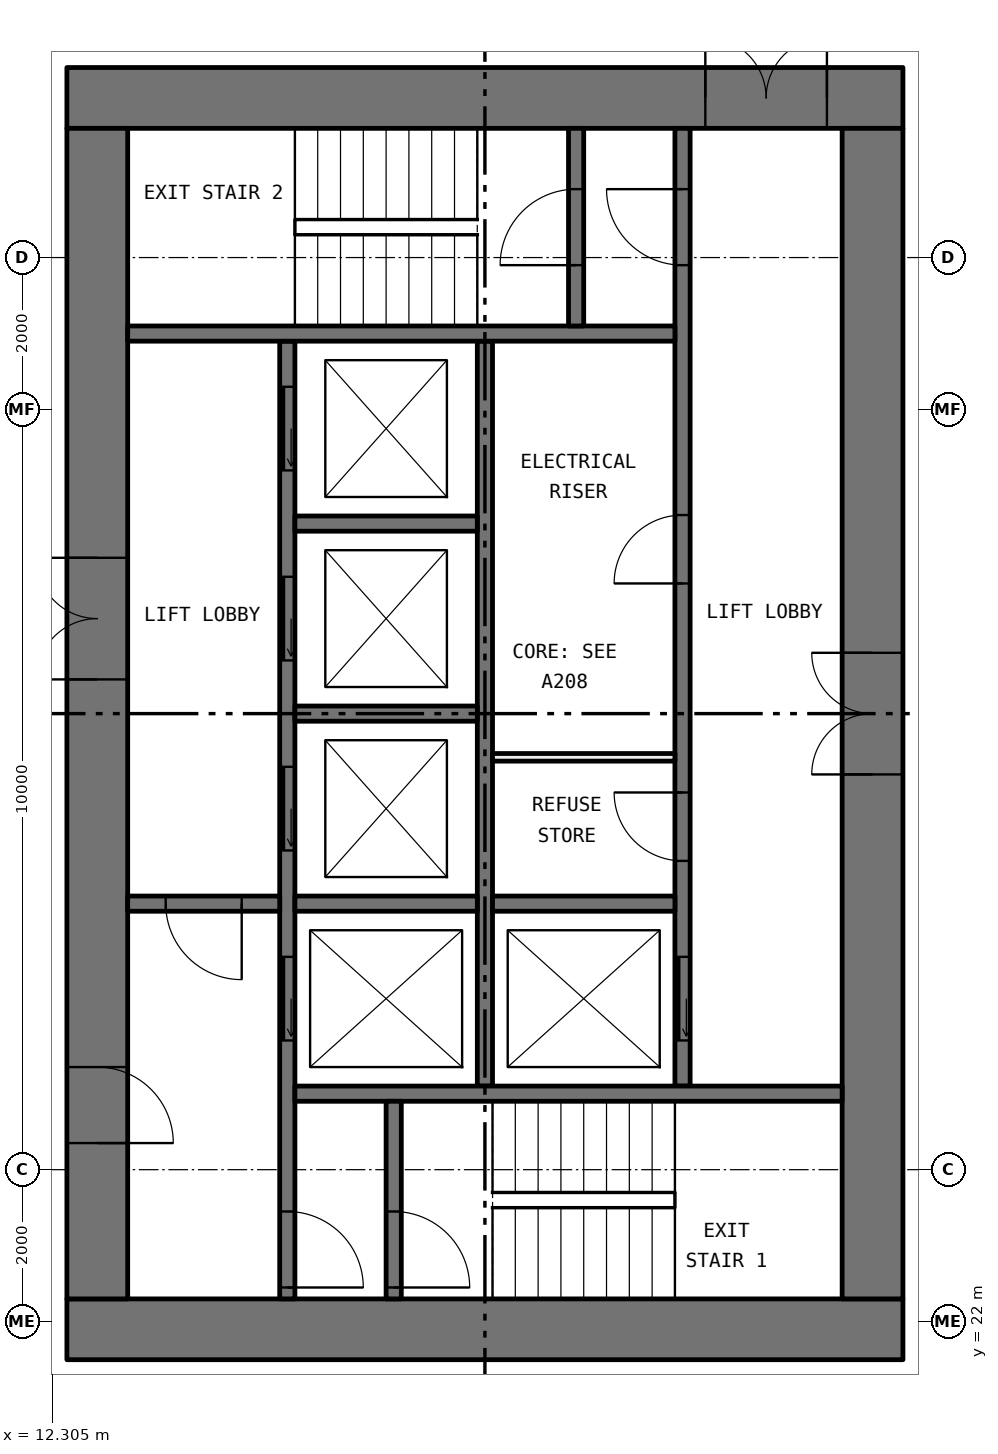
"""IFC4 building model, lengths in metres.
Left out: names, types, materials, properties, quantities, classifications, styles, units other than length and angle.
Written with IfcOpenShell. Run it as: python <this file> out.ifc"""

import sys

from ifc_helpers import new_model, si_unit, direction, frame, frame_2d, origin, place, context, subcontext, project, spatial, rectangle, extrude, element, fill, save


model = new_model("IFC4")
c1 = context("Model", 3, precision=1e-05, world=origin(), true_north=direction((0.0, 1.0)))
c2 = subcontext(c1, "Body", "Model", "MODEL_VIEW")
j1 = project(units=[si_unit("LENGTHUNIT", "METRE"), si_unit("PLANEANGLEUNIT", "RADIAN")], contexts=[c1])
p1 = place(None, origin())
s1 = spatial("IfcSite", under=j1, at=p1, CompositionType="ELEMENT")
p2 = place(p1, origin())
s2 = spatial("IfcBuilding", under=s1, at=p2, CompositionType="ELEMENT")
p3 = place(p2, frame((0.0, 0.0, 36.9)))
s3 = spatial("IfcBuildingStorey", under=s2, at=p3, CompositionType="ELEMENT", Elevation=36.9)
p4 = place(p3, frame((12.5, 21.9, 0.0), z_axis=(0.0, 0.0, 1.0), x_axis=(1.0, 0.0, 0.0)))
e1 = element("IfcWall", 1, at=p4, inside=s3, PredefinedType="SHEAR", context=c2, shape_type="SweptSolid", body=[
    extrude(rectangle(XDim=11.0, YDim=0.8, at=frame_2d((5.5, 0.0))), origin(), (0.0, 0.0, 1.0), 3.05),
])
p5 = place(p3, frame((12.5, 38.1, 0.0), z_axis=(0.0, 0.0, 1.0), x_axis=(1.0, 0.0, 0.0)))
e2 = element("IfcWall", 2, at=p5, inside=s3, PredefinedType="SHEAR", context=c2, shape_type="SweptSolid", body=[
    extrude(rectangle(XDim=11.0, YDim=0.8, at=frame_2d((5.5, 0.0))), origin(), (0.0, 0.0, 1.0), 3.05),
])
p6 = place(p5, frame((8.4, 0.0, 0.0)))
e3 = element("IfcOpeningElement", 3, at=p6, cuts=e2, PredefinedType="OPENING", context=c2, shape_type="SweptSolid", body=[
    extrude(rectangle(XDim=1.6, YDim=2.1, at=frame_2d((0.8, 1.05))), frame((0.0, 0.41, 0.0), z_axis=(0.0, -1.0, 0.0), x_axis=(1.0, 0.0, 0.0)), (0.0, 0.0, 1.0), 0.82),
])
p7 = place(p3, frame((12.9, 22.3, 0.0), z_axis=(0.0, 0.0, 1.0), x_axis=(0.0, 1.0, 0.0)))
e4 = element("IfcWall", 4, at=p7, inside=s3, PredefinedType="SHEAR", context=c2, shape_type="SweptSolid", body=[
    extrude(rectangle(XDim=15.4, YDim=0.8, at=frame_2d((7.7, 0.0))), origin(), (0.0, 0.0, 1.0), 3.05),
])
p8 = place(p7, frame((8.15, 0.0, 0.0)))
e5 = element("IfcOpeningElement", 5, at=p8, cuts=e4, PredefinedType="OPENING", context=c2, shape_type="SweptSolid", body=[
    extrude(rectangle(XDim=1.6, YDim=2.1, at=frame_2d((0.8, 1.05))), frame((0.0, 0.41, 0.0), z_axis=(0.0, -1.0, 0.0), x_axis=(1.0, 0.0, 0.0)), (0.0, 0.0, 1.0), 0.82),
])
p9 = place(p7, frame((2.05, 0.0, 0.0)))
e6 = element("IfcOpeningElement", 6, at=p9, cuts=e4, PredefinedType="OPENING", context=c2, shape_type="SweptSolid", body=[
    extrude(rectangle(XDim=1.0, YDim=2.1, at=frame_2d((0.5, 1.05))), frame((0.0, 0.41, 0.0), z_axis=(0.0, -1.0, 0.0), x_axis=(1.0, 0.0, 0.0)), (0.0, 0.0, 1.0), 0.82),
])
p10 = place(p3, frame((23.1, 22.3, 0.0), z_axis=(0.0, 0.0, 1.0), x_axis=(0.0, 1.0, 0.0)))
e7 = element("IfcWall", 7, at=p10, inside=s3, PredefinedType="SHEAR", context=c2, shape_type="SweptSolid", body=[
    extrude(rectangle(XDim=15.4, YDim=0.8, at=frame_2d((7.7, 0.0))), origin(), (0.0, 0.0, 1.0), 3.05),
])
p11 = place(p10, frame((6.9, 0.0, 0.0)))
e8 = element("IfcOpeningElement", 8, at=p11, cuts=e7, PredefinedType="OPENING", context=c2, shape_type="SweptSolid", body=[
    extrude(rectangle(XDim=1.6, YDim=2.1, at=frame_2d((0.8, 1.05))), frame((0.0, 0.41, 0.0), z_axis=(0.0, -1.0, 0.0), x_axis=(1.0, 0.0, 0.0)), (0.0, 0.0, 1.0), 0.82),
])
p12 = place(p3, frame((15.4, 22.3, 0.0), z_axis=(0.0, 0.0, 1.0), x_axis=(0.0, 1.0, 0.0)))
e9 = element("IfcWall", 9, at=p12, inside=s3, PredefinedType="SOLIDWALL", context=c2, shape_type="SweptSolid", body=[
    extrude(rectangle(XDim=12.6, YDim=0.2, at=frame_2d((6.3, 0.0))), origin(), (0.0, 0.0, 1.0), 3.05),
])
p13 = place(p12, frame((3.4, 0.0, 0.0)))
e10 = element("IfcOpeningElement", 10, at=p13, cuts=e9, PredefinedType="OPENING", context=c2, shape_type="SweptSolid", body=[
    extrude(rectangle(XDim=1.1, YDim=2.1, at=frame_2d((0.55, 1.05))), frame((0.0, 0.11, 0.0), z_axis=(0.0, -1.0, 0.0), x_axis=(1.0, 0.0, 0.0)), (0.0, 0.0, 1.0), 0.22),
])
p14 = place(p12, frame((5.9, 0.0, 0.0)))
e11 = element("IfcOpeningElement", 11, at=p14, cuts=e9, PredefinedType="OPENING", context=c2, shape_type="SweptSolid", body=[
    extrude(rectangle(XDim=1.1, YDim=2.1, at=frame_2d((0.55, 1.05))), frame((0.0, 0.11, 0.0), z_axis=(0.0, -1.0, 0.0), x_axis=(1.0, 0.0, 0.0)), (0.0, 0.0, 1.0), 0.22),
])
p15 = place(p12, frame((8.4, 0.0, 0.0)))
e12 = element("IfcOpeningElement", 12, at=p15, cuts=e9, PredefinedType="OPENING", context=c2, shape_type="SweptSolid", body=[
    extrude(rectangle(XDim=1.1, YDim=2.1, at=frame_2d((0.55, 1.05))), frame((0.0, 0.11, 0.0), z_axis=(0.0, -1.0, 0.0), x_axis=(1.0, 0.0, 0.0)), (0.0, 0.0, 1.0), 0.22),
])
p16 = place(p12, frame((10.9, 0.0, 0.0)))
e13 = element("IfcOpeningElement", 13, at=p16, cuts=e9, PredefinedType="OPENING", context=c2, shape_type="SweptSolid", body=[
    extrude(rectangle(XDim=1.1, YDim=2.1, at=frame_2d((0.55, 1.05))), frame((0.0, 0.11, 0.0), z_axis=(0.0, -1.0, 0.0), x_axis=(1.0, 0.0, 0.0)), (0.0, 0.0, 1.0), 0.22),
])
p17 = place(p12, frame((0.15, 0.0, 0.0)))
e14 = element("IfcOpeningElement", 14, at=p17, cuts=e9, PredefinedType="OPENING", context=c2, shape_type="SweptSolid", body=[
    extrude(rectangle(XDim=1.0, YDim=2.1, at=frame_2d((0.5, 1.05))), frame((0.0, 0.11, 0.0), z_axis=(0.0, -1.0, 0.0), x_axis=(1.0, 0.0, 0.0)), (0.0, 0.0, 1.0), 0.22),
])
p18 = place(p3, frame((20.6, 25.1, 0.0), z_axis=(0.0, 0.0, 1.0), x_axis=(0.0, 1.0, 0.0)))
e15 = element("IfcWall", 15, at=p18, inside=s3, PredefinedType="SOLIDWALL", context=c2, shape_type="SweptSolid", body=[
    extrude(rectangle(XDim=12.6, YDim=0.2, at=frame_2d((6.3, 0.0))), origin(), (0.0, 0.0, 1.0), 3.05),
])
p19 = place(p18, frame((0.6, 0.0, 0.0)))
e16 = element("IfcOpeningElement", 16, at=p19, cuts=e15, PredefinedType="OPENING", context=c2, shape_type="SweptSolid", body=[
    extrude(rectangle(XDim=1.1, YDim=2.1, at=frame_2d((0.55, 1.05))), frame((0.0, 0.11, 0.0), z_axis=(0.0, -1.0, 0.0), x_axis=(1.0, 0.0, 0.0)), (0.0, 0.0, 1.0), 0.22),
])
p20 = place(p18, frame((10.8, 0.0, 0.0)))
e17 = element("IfcOpeningElement", 17, at=p20, cuts=e15, PredefinedType="OPENING", context=c2, shape_type="SweptSolid", body=[
    extrude(rectangle(XDim=1.0, YDim=2.1, at=frame_2d((0.5, 1.05))), frame((0.0, 0.11, 0.0), z_axis=(0.0, -1.0, 0.0), x_axis=(1.0, 0.0, 0.0)), (0.0, 0.0, 1.0), 0.22),
])
p21 = place(p18, frame((2.962, 0.0, 0.0)))
e18 = element("IfcOpeningElement", 18, at=p21, cuts=e15, PredefinedType="OPENING", context=c2, shape_type="SweptSolid", body=[
    extrude(rectangle(XDim=0.9, YDim=2.1, at=frame_2d((0.45, 1.05))), frame((0.0, 0.11, 0.0), z_axis=(0.0, -1.0, 0.0), x_axis=(1.0, 0.0, 0.0)), (0.0, 0.0, 1.0), 0.22),
])
p22 = place(p18, frame((6.613, 0.0, 0.0)))
e19 = element("IfcOpeningElement", 19, at=p22, cuts=e15, PredefinedType="OPENING", context=c2, shape_type="SweptSolid", body=[
    extrude(rectangle(XDim=0.9, YDim=2.1, at=frame_2d((0.45, 1.05))), frame((0.0, 0.11, 0.0), z_axis=(0.0, -1.0, 0.0), x_axis=(1.0, 0.0, 0.0)), (0.0, 0.0, 1.0), 0.22),
])
p23 = place(p3, frame((18.0, 25.1, 0.0), z_axis=(0.0, 0.0, 1.0), x_axis=(0.0, 1.0, 0.0)))
e20 = element("IfcWall", 20, at=p23, inside=s3, PredefinedType="SOLIDWALL", context=c2, shape_type="SweptSolid", body=[
    extrude(rectangle(XDim=9.8, YDim=0.2, at=frame_2d((4.9, 0.0))), origin(), (0.0, 0.0, 1.0), 3.05),
])
for number, where, z_axis, x_axis in (
    (21, (15.5, 25.0, 0.0), (0.0, 0.0, 1.0), (1.0, 0.0, 0.0)),
    (22, (13.3, 35.0, 0.0), (0.0, 0.0, 1.0), (1.0, 0.0, 0.0)),
):
    element("IfcWall", number, at=place(p3, frame(where, z_axis=z_axis, x_axis=x_axis)), inside=s3, PredefinedType="SOLIDWALL", context=c2, shape_type="SweptSolid", body=[
        extrude(rectangle(XDim=7.2, YDim=0.2, at=frame_2d((3.6, 0.0))), origin(), (0.0, 0.0, 1.0), 3.05),
    ])
p24 = place(p3, frame((13.3, 27.5, 0.0), z_axis=(0.0, 0.0, 1.0), x_axis=(1.0, 0.0, 0.0)))
e23 = element("IfcWall", 23, at=p24, inside=s3, PredefinedType="SOLIDWALL", context=c2, shape_type="SweptSolid", body=[
    extrude(rectangle(XDim=2.0, YDim=0.2, at=frame_2d((1.0, 0.0))), origin(), (0.0, 0.0, 1.0), 3.05),
])
p25 = place(p24, frame((0.5, 0.0, 0.0)))
e24 = element("IfcOpeningElement", 24, at=p25, cuts=e23, PredefinedType="OPENING", context=c2, shape_type="SweptSolid", body=[
    extrude(rectangle(XDim=1.0, YDim=2.1, at=frame_2d((0.5, 1.05))), frame((0.0, 0.11, 0.0), z_axis=(0.0, -1.0, 0.0), x_axis=(1.0, 0.0, 0.0)), (0.0, 0.0, 1.0), 0.22),
])
p26 = place(p3, frame((16.8, 22.3, 0.0), z_axis=(0.0, 0.0, 1.0), x_axis=(0.0, 1.0, 0.0)))
e25 = element("IfcWall", 25, at=p26, inside=s3, PredefinedType="SOLIDWALL", context=c2, shape_type="SweptSolid", body=[
    extrude(rectangle(XDim=2.6, YDim=0.2, at=frame_2d((1.3, 0.0))), origin(), (0.0, 0.0, 1.0), 3.05),
])
p27 = place(p26, frame((0.15, 0.0, 0.0)))
e26 = element("IfcOpeningElement", 26, at=p27, cuts=e25, PredefinedType="OPENING", context=c2, shape_type="SweptSolid", body=[
    extrude(rectangle(XDim=1.0, YDim=2.1, at=frame_2d((0.5, 1.05))), frame((0.0, 0.11, 0.0), z_axis=(0.0, -1.0, 0.0), x_axis=(1.0, 0.0, 0.0)), (0.0, 0.0, 1.0), 0.22),
])
p28 = place(p3, frame((19.2, 35.1, 0.0), z_axis=(0.0, 0.0, 1.0), x_axis=(0.0, 1.0, 0.0)))
e27 = element("IfcWall", 27, at=p28, inside=s3, PredefinedType="SOLIDWALL", context=c2, shape_type="SweptSolid", body=[
    extrude(rectangle(XDim=2.6, YDim=0.2, at=frame_2d((1.3, 0.0))), origin(), (0.0, 0.0, 1.0), 3.05),
])
p29 = place(p28, frame((0.8, 0.0, 0.0)))
e28 = element("IfcOpeningElement", 28, at=p29, cuts=e27, PredefinedType="OPENING", context=c2, shape_type="SweptSolid", body=[
    extrude(rectangle(XDim=1.0, YDim=2.1, at=frame_2d((0.5, 1.05))), frame((0.0, 0.11, 0.0), z_axis=(0.0, -1.0, 0.0), x_axis=(1.0, 0.0, 0.0)), (0.0, 0.0, 1.0), 0.22),
])
for number, where, z_axis, x_axis in (
    (29, (15.5, 27.5, 0.0), (0.0, 0.0, 1.0), (1.0, 0.0, 0.0)),
    (30, (15.5, 30.0, 0.0), (0.0, 0.0, 1.0), (1.0, 0.0, 0.0)),
    (31, (15.5, 32.5, 0.0), (0.0, 0.0, 1.0), (1.0, 0.0, 0.0)),
    (32, (18.1, 27.5, 0.0), (0.0, 0.0, 1.0), (1.0, 0.0, 0.0)),
):
    element("IfcWall", number, at=place(p3, frame(where, z_axis=z_axis, x_axis=x_axis)), inside=s3, PredefinedType="SOLIDWALL", context=c2, shape_type="SweptSolid", body=[
        extrude(rectangle(XDim=2.4, YDim=0.2, at=frame_2d((1.2, 0.0))), origin(), (0.0, 0.0, 1.0), 3.05),
    ])
p30 = place(p3, frame((18.1, 29.425, 0.0), z_axis=(0.0, 0.0, 1.0), x_axis=(1.0, 0.0, 0.0)))
e33 = element("IfcWall", 33, at=p30, inside=s3, PredefinedType="PARTITIONING", context=c2, shape_type="SweptSolid", body=[
    extrude(rectangle(XDim=2.4, YDim=0.1, at=frame_2d((1.2, 0.0))), origin(), (0.0, 0.0, 1.0), 3.05),
])
p31 = place(p19, origin())
e34 = element("IfcDoor", 34, at=p31, inside=s3, OperationType="SLIDING_TO_LEFT", PredefinedType="DOOR", context=c2, shape_type="SweptSolid", body=[
    extrude(rectangle(XDim=1.1, YDim=2.1, at=frame_2d((0.55, 1.05))), frame((0.0, 0.025, 0.0), z_axis=(0.0, -1.0, 0.0), x_axis=(1.0, 0.0, 0.0)), (0.0, 0.0, 1.0), 0.05),
])
fill(e16, e34)
p32 = place(p13, origin())
e35 = element("IfcDoor", 35, at=p32, inside=s3, OperationType="SLIDING_TO_LEFT", PredefinedType="DOOR", context=c2, shape_type="SweptSolid", body=[
    extrude(rectangle(XDim=1.1, YDim=2.1, at=frame_2d((0.55, 1.05))), frame((0.0, 0.025, 0.0), z_axis=(0.0, -1.0, 0.0), x_axis=(1.0, 0.0, 0.0)), (0.0, 0.0, 1.0), 0.05),
])
fill(e10, e35)
p33 = place(p14, origin())
e36 = element("IfcDoor", 36, at=p33, inside=s3, OperationType="SLIDING_TO_LEFT", PredefinedType="DOOR", context=c2, shape_type="SweptSolid", body=[
    extrude(rectangle(XDim=1.1, YDim=2.1, at=frame_2d((0.55, 1.05))), frame((0.0, 0.025, 0.0), z_axis=(0.0, -1.0, 0.0), x_axis=(1.0, 0.0, 0.0)), (0.0, 0.0, 1.0), 0.05),
])
fill(e11, e36)
p34 = place(p15, origin())
e37 = element("IfcDoor", 37, at=p34, inside=s3, OperationType="SLIDING_TO_LEFT", PredefinedType="DOOR", context=c2, shape_type="SweptSolid", body=[
    extrude(rectangle(XDim=1.1, YDim=2.1, at=frame_2d((0.55, 1.05))), frame((0.0, 0.025, 0.0), z_axis=(0.0, -1.0, 0.0), x_axis=(1.0, 0.0, 0.0)), (0.0, 0.0, 1.0), 0.05),
])
fill(e12, e37)
p35 = place(p16, origin())
e38 = element("IfcDoor", 38, at=p35, inside=s3, OperationType="SLIDING_TO_LEFT", PredefinedType="DOOR", context=c2, shape_type="SweptSolid", body=[
    extrude(rectangle(XDim=1.1, YDim=2.1, at=frame_2d((0.55, 1.05))), frame((0.0, 0.025, 0.0), z_axis=(0.0, -1.0, 0.0), x_axis=(1.0, 0.0, 0.0)), (0.0, 0.0, 1.0), 0.05),
])
fill(e13, e38)
p36 = place(p27, frame((1.0, 0.0, 0.0), x_axis=(-1.0, 0.0, 0.0)))
e39 = element("IfcDoor", 39, at=p36, inside=s3, OperationType="SINGLE_SWING_LEFT", PredefinedType="DOOR", context=c2, shape_type="SweptSolid", body=[
    extrude(rectangle(XDim=1.0, YDim=2.1, at=frame_2d((0.5, 1.05))), frame((0.0, 0.025, 0.0), z_axis=(0.0, -1.0, 0.0), x_axis=(1.0, 0.0, 0.0)), (0.0, 0.0, 1.0), 0.05),
])
fill(e26, e39)
p37 = place(p17, frame((1.0, 0.0, 0.0), x_axis=(-1.0, 0.0, 0.0)))
e40 = element("IfcDoor", 40, at=p37, inside=s3, OperationType="SINGLE_SWING_LEFT", PredefinedType="DOOR", context=c2, shape_type="SweptSolid", body=[
    extrude(rectangle(XDim=1.0, YDim=2.1, at=frame_2d((0.5, 1.05))), frame((0.0, 0.025, 0.0), z_axis=(0.0, -1.0, 0.0), x_axis=(1.0, 0.0, 0.0)), (0.0, 0.0, 1.0), 0.05),
])
fill(e14, e40)
p38 = place(p20, origin())
e41 = element("IfcDoor", 41, at=p38, inside=s3, OperationType="SINGLE_SWING_LEFT", PredefinedType="DOOR", context=c2, shape_type="SweptSolid", body=[
    extrude(rectangle(XDim=1.0, YDim=2.1, at=frame_2d((0.5, 1.05))), frame((0.0, 0.025, 0.0), z_axis=(0.0, -1.0, 0.0), x_axis=(1.0, 0.0, 0.0)), (0.0, 0.0, 1.0), 0.05),
])
fill(e17, e41)
p39 = place(p29, origin())
e42 = element("IfcDoor", 42, at=p39, inside=s3, OperationType="SINGLE_SWING_RIGHT", PredefinedType="DOOR", context=c2, shape_type="SweptSolid", body=[
    extrude(rectangle(XDim=1.0, YDim=2.1, at=frame_2d((0.5, 1.05))), frame((0.0, 0.025, 0.0), z_axis=(0.0, -1.0, 0.0), x_axis=(1.0, 0.0, 0.0)), (0.0, 0.0, 1.0), 0.05),
])
fill(e28, e42)
p40 = place(p25, frame((1.0, 0.0, 0.0), x_axis=(-1.0, 0.0, 0.0)))
e43 = element("IfcDoor", 43, at=p40, inside=s3, OperationType="SINGLE_SWING_RIGHT", PredefinedType="DOOR", context=c2, shape_type="SweptSolid", body=[
    extrude(rectangle(XDim=1.0, YDim=2.1, at=frame_2d((0.5, 1.05))), frame((0.0, 0.025, 0.0), z_axis=(0.0, -1.0, 0.0), x_axis=(1.0, 0.0, 0.0)), (0.0, 0.0, 1.0), 0.05),
])
fill(e24, e43)
p41 = place(p8, origin())
e44 = element("IfcDoor", 44, at=p41, inside=s3, OperationType="DOUBLE_DOOR_SINGLE_SWING", PredefinedType="DOOR", context=c2, shape_type="SweptSolid", body=[
    extrude(rectangle(XDim=1.6, YDim=2.1, at=frame_2d((0.8, 1.05))), frame((0.0, 0.025, 0.0), z_axis=(0.0, -1.0, 0.0), x_axis=(1.0, 0.0, 0.0)), (0.0, 0.0, 1.0), 0.05),
])
fill(e5, e44)
p42 = place(p9, frame((1.0, 0.0, 0.0), x_axis=(-1.0, 0.0, 0.0)))
e45 = element("IfcDoor", 45, at=p42, inside=s3, OperationType="SINGLE_SWING_LEFT", PredefinedType="DOOR", context=c2, shape_type="SweptSolid", body=[
    extrude(rectangle(XDim=1.0, YDim=2.1, at=frame_2d((0.5, 1.05))), frame((0.0, 0.025, 0.0), z_axis=(0.0, -1.0, 0.0), x_axis=(1.0, 0.0, 0.0)), (0.0, 0.0, 1.0), 0.05),
])
fill(e6, e45)
p43 = place(p6, origin())
e46 = element("IfcDoor", 46, at=p43, inside=s3, OperationType="DOUBLE_DOOR_SINGLE_SWING", PredefinedType="DOOR", context=c2, shape_type="SweptSolid", body=[
    extrude(rectangle(XDim=1.6, YDim=2.1, at=frame_2d((0.8, 1.05))), frame((0.0, 0.025, 0.0), z_axis=(0.0, -1.0, 0.0), x_axis=(1.0, 0.0, 0.0)), (0.0, 0.0, 1.0), 0.05),
])
fill(e3, e46)
p44 = place(p11, origin())
e47 = element("IfcDoor", 47, at=p44, inside=s3, OperationType="DOUBLE_DOOR_SINGLE_SWING", PredefinedType="DOOR", context=c2, shape_type="SweptSolid", body=[
    extrude(rectangle(XDim=1.6, YDim=2.1, at=frame_2d((0.8, 1.05))), frame((0.0, 0.025, 0.0), z_axis=(0.0, -1.0, 0.0), x_axis=(1.0, 0.0, 0.0)), (0.0, 0.0, 1.0), 0.05),
])
fill(e8, e47)
p45 = place(p21, origin())
e48 = element("IfcDoor", 48, at=p45, inside=s3, OperationType="SINGLE_SWING_LEFT", PredefinedType="DOOR", context=c2, shape_type="SweptSolid", body=[
    extrude(rectangle(XDim=0.9, YDim=2.1, at=frame_2d((0.45, 1.05))), frame((0.0, 0.025, 0.0), z_axis=(0.0, -1.0, 0.0), x_axis=(1.0, 0.0, 0.0)), (0.0, 0.0, 1.0), 0.05),
])
fill(e18, e48)
p46 = place(p22, origin())
e49 = element("IfcDoor", 49, at=p46, inside=s3, OperationType="SINGLE_SWING_RIGHT", PredefinedType="DOOR", context=c2, shape_type="SweptSolid", body=[
    extrude(rectangle(XDim=0.9, YDim=2.1, at=frame_2d((0.45, 1.05))), frame((0.0, 0.025, 0.0), z_axis=(0.0, -1.0, 0.0), x_axis=(1.0, 0.0, 0.0)), (0.0, 0.0, 1.0), 0.05),
])
fill(e19, e49)
save(model, sys.argv[1])
